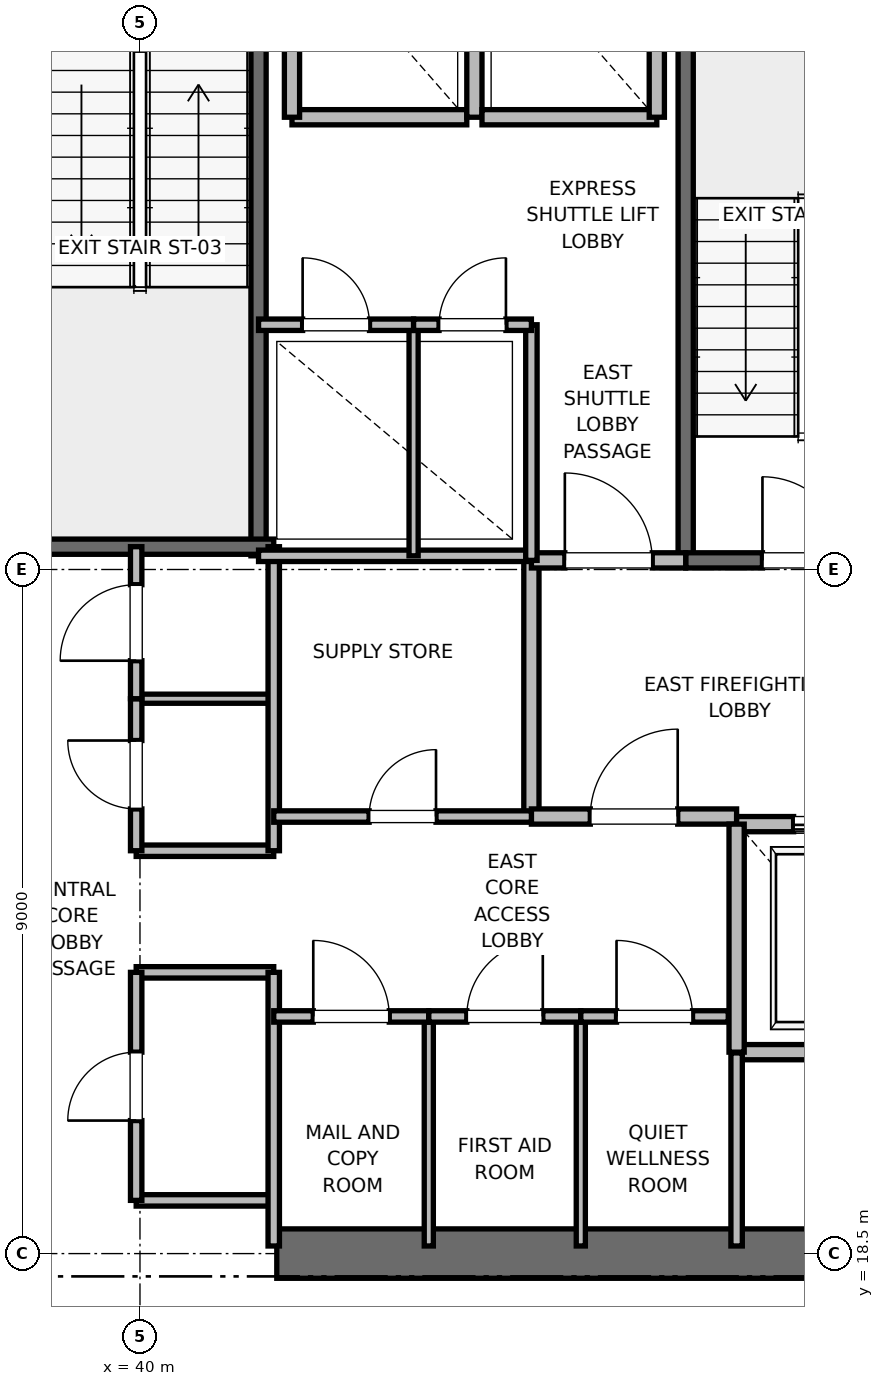
"""IFC4 building model, lengths in metres.
Left out: names, types, materials, properties, quantities, classifications, styles, units other than length and angle.
Written with IfcOpenShell. Run it as: python <this file> out.ifc"""

import sys

from ifc_helpers import new_model, si_unit, direction, frame, frame_2d, origin, place, context, subcontext, project, spatial, rectangle, extrude, element, fill, save


model = new_model("IFC4")
c1 = context("Model", 3, precision=1e-05, world=origin(), true_north=direction((0.0, 1.0)))
c2 = subcontext(c1, "Body", "Model", "MODEL_VIEW")
j1 = project(units=[si_unit("LENGTHUNIT", "METRE"), si_unit("PLANEANGLEUNIT", "RADIAN")], contexts=[c1])
p1 = place(None, origin())
s1 = spatial("IfcSite", under=j1, at=p1, CompositionType="ELEMENT")
p2 = place(p1, origin())
s2 = spatial("IfcBuilding", under=s1, at=p2, CompositionType="ELEMENT")
p3 = place(p2, frame((0.0, 0.0, 27.6)))
s3 = spatial("IfcBuildingStorey", under=s2, at=p3, CompositionType="ELEMENT", Elevation=27.6)
p4 = place(p3, frame((41.8, 18.5, 0.0), z_axis=(0.0, 0.0, 1.0), x_axis=(1.0, 0.0, 0.0)))
e1 = element("IfcWall", 1, at=p4, inside=s3, PredefinedType="SHEAR", context=c2, shape_type="SweptSolid", body=[
    extrude(rectangle(XDim=9.2, YDim=0.65, at=frame_2d((4.6, 0.0))), origin(), (0.0, 0.0, 1.0), 3.76),
])
p5 = place(p3, frame((47.18, 27.62, 0.0), z_axis=(0.0, 0.0, 1.0), x_axis=(0.0, 1.0, 0.0)))
e2 = element("IfcWall", 2, at=p5, inside=s3, PredefinedType="SOLIDWALL", context=c2, shape_type="SweptSolid", body=[
    extrude(rectangle(XDim=8.18, YDim=0.2, at=frame_2d((4.09, 0.0))), origin(), (0.0, 0.0, 1.0), 3.76),
])
p6 = place(p3, frame((47.18, 27.62, 0.0), z_axis=(0.0, 0.0, 1.0), x_axis=(1.0, 0.0, 0.0)))
e3 = element("IfcWall", 3, at=p6, inside=s3, PredefinedType="SOLIDWALL", context=c2, shape_type="SweptSolid", body=[
    extrude(rectangle(XDim=3.12, YDim=0.2, at=frame_2d((1.56, 0.0))), origin(), (0.0, 0.0, 1.0), 3.76),
])
p7 = place(p6, frame((1.01, 0.0, 0.0)))
e4 = element("IfcOpeningElement", 4, at=p7, cuts=e3, PredefinedType="OPENING", context=c2, shape_type="SweptSolid", body=[
    extrude(rectangle(XDim=1.1, YDim=2.15, at=frame_2d((0.55, 1.075))), frame((0.0, 0.1, 0.0), z_axis=(0.0, -1.0, 0.0), x_axis=(1.0, 0.0, 0.0)), (0.0, 0.0, 1.0), 0.2),
])
p8 = place(p3, frame((41.56, 27.68, 0.0), z_axis=(0.0, 0.0, 1.0), x_axis=(0.0, 1.0, 0.0)))
e5 = element("IfcWall", 5, at=p8, inside=s3, PredefinedType="SOLIDWALL", context=c2, shape_type="SweptSolid", body=[
    extrude(rectangle(XDim=8.57, YDim=0.2, at=frame_2d((4.285, 0.0))), origin(), (0.0, 0.0, 1.0), 3.76),
])
p9 = place(p3, frame((38.44, 27.8, 0.0), z_axis=(0.0, 0.0, 1.0), x_axis=(1.0, 0.0, 0.0)))
e6 = element("IfcWall", 6, at=p9, inside=s3, PredefinedType="SOLIDWALL", context=c2, shape_type="SweptSolid", body=[
    extrude(rectangle(XDim=3.32, YDim=0.2, at=frame_2d((1.66, 0.0))), origin(), (0.0, 0.0, 1.0), 3.76),
])
p10 = place(p3, frame((45.15, 24.25, 0.0), z_axis=(0.0, 0.0, 1.0), x_axis=(0.0, 1.0, 0.0)))
e7 = element("IfcWall", 7, at=p10, inside=s3, PredefinedType="PARTITIONING", context=c2, shape_type="SweptSolid", body=[
    extrude(rectangle(XDim=3.37, YDim=0.2, at=frame_2d((1.685, 0.0))), origin(), (0.0, 0.0, 1.0), 3.76),
])
p11 = place(p3, frame((45.15, 24.25, 0.0), z_axis=(0.0, 0.0, 1.0), x_axis=(1.0, 0.0, 0.0)))
e8 = element("IfcWall", 8, at=p11, inside=s3, PredefinedType="PARTITIONING", context=c2, shape_type="SweptSolid", body=[
    extrude(rectangle(XDim=2.7, YDim=0.2, at=frame_2d((1.35, 0.0))), origin(), (0.0, 0.0, 1.0), 3.76),
])
p12 = place(p11, frame((0.775, 0.0, 0.0)))
e9 = element("IfcOpeningElement", 9, at=p12, cuts=e8, PredefinedType="OPENING", context=c2, shape_type="SweptSolid", body=[
    extrude(rectangle(XDim=1.15, YDim=2.2, at=frame_2d((0.575, 1.1))), frame((0.0, 0.1, 0.0), z_axis=(0.0, -1.0, 0.0), x_axis=(1.0, 0.0, 0.0)), (0.0, 0.0, 1.0), 0.2),
])
p13 = place(p3, frame((45.15, 27.62, 0.0), z_axis=(0.0, 0.0, 1.0), x_axis=(1.0, 0.0, 0.0)))
e10 = element("IfcWall", 10, at=p13, inside=s3, PredefinedType="PARTITIONING", context=c2, shape_type="SweptSolid", body=[
    extrude(rectangle(XDim=2.03, YDim=0.2, at=frame_2d((1.015, 0.0))), origin(), (0.0, 0.0, 1.0), 3.76),
])
p14 = place(p13, frame((0.44, 0.0, 0.0)))
e11 = element("IfcOpeningElement", 11, at=p14, cuts=e10, PredefinedType="OPENING", context=c2, shape_type="SweptSolid", body=[
    extrude(rectangle(XDim=1.15, YDim=2.2, at=frame_2d((0.575, 1.1))), frame((0.0, 0.1, 0.0), z_axis=(0.0, -1.0, 0.0), x_axis=(1.0, 0.0, 0.0)), (0.0, 0.0, 1.0), 0.2),
])
p15 = place(p3, frame((47.85, 21.15, 0.0), z_axis=(0.0, 0.0, 1.0), x_axis=(1.0, 0.0, 0.0)))
e12 = element("IfcWall", 12, at=p15, inside=s3, PredefinedType="SOLIDWALL", context=c2, shape_type="SweptSolid", body=[
    extrude(rectangle(XDim=2.6, YDim=0.2, at=frame_2d((1.3, 0.0))), origin(), (0.0, 0.0, 1.0), 3.76),
])
p16 = place(p3, frame((50.45, 24.15, 0.0), z_axis=(0.0, 0.0, 1.0), x_axis=(-1.0, 0.0, 0.0)))
e13 = element("IfcWall", 13, at=p16, inside=s3, PredefinedType="SOLIDWALL", context=c2, shape_type="SweptSolid", body=[
    extrude(rectangle(XDim=2.6, YDim=0.2, at=frame_2d((1.3, 0.0))), origin(), (0.0, 0.0, 1.0), 2.54),
])
p17 = place(p16, frame((0.75, 0.0, 0.0)))
e14 = element("IfcOpeningElement", 14, at=p17, cuts=e13, PredefinedType="OPENING", context=c2, shape_type="SweptSolid", body=[
    extrude(rectangle(XDim=1.1, YDim=2.2, at=frame_2d((0.55, 1.1))), frame((0.0, 0.1, 0.0), z_axis=(0.0, -1.0, 0.0), x_axis=(1.0, 0.0, 0.0)), (0.0, 0.0, 1.0), 0.2),
])
p18 = place(p3, frame((47.85, 24.15, 0.0), z_axis=(0.0, 0.0, 1.0), x_axis=(0.0, -1.0, 0.0)))
e15 = element("IfcWall", 15, at=p18, inside=s3, PredefinedType="SOLIDWALL", context=c2, shape_type="SweptSolid", body=[
    extrude(rectangle(XDim=3.0, YDim=0.2, at=frame_2d((1.5, 0.0))), origin(), (0.0, 0.0, 1.0), 3.76),
])
p19 = place(p3, frame((42.0, 33.45, 0.0), z_axis=(0.0, 0.0, 1.0), x_axis=(1.0, 0.0, 0.0)))
e16 = element("IfcWall", 16, at=p19, inside=s3, PredefinedType="SOLIDWALL", context=c2, shape_type="SweptSolid", body=[
    extrude(rectangle(XDim=2.3, YDim=0.2, at=frame_2d((1.15, 0.0))), origin(), (0.0, 0.0, 1.0), 3.76),
])
for number, where, z_axis, x_axis in (
    (17, (42.0, 36.05, 0.0), (0.0, 0.0, 1.0), (0.0, -1.0, 0.0)),
    (18, (44.4, 33.45, 0.0), (0.0, 0.0, 1.0), (0.0, 1.0, 0.0)),
):
    element("IfcWall", number, at=place(p3, frame(where, z_axis=z_axis, x_axis=x_axis)), inside=s3, PredefinedType="SOLIDWALL", context=c2, shape_type="SweptSolid", body=[
        extrude(rectangle(XDim=2.6, YDim=0.2, at=frame_2d((1.3, 0.0))), origin(), (0.0, 0.0, 1.0), 2.54),
    ])
p20 = place(p3, frame((44.5, 33.45, 0.0), z_axis=(0.0, 0.0, 1.0), x_axis=(1.0, 0.0, 0.0)))
e19 = element("IfcWall", 19, at=p20, inside=s3, PredefinedType="SOLIDWALL", context=c2, shape_type="SweptSolid", body=[
    extrude(rectangle(XDim=2.3, YDim=0.2, at=frame_2d((1.15, 0.0))), origin(), (0.0, 0.0, 1.0), 3.76),
])
p21 = place(p3, frame((46.8, 33.45, 0.0), z_axis=(0.0, 0.0, 1.0), x_axis=(0.0, 1.0, 0.0)))
e20 = element("IfcWall", 20, at=p21, inside=s3, PredefinedType="SOLIDWALL", context=c2, shape_type="SweptSolid", body=[
    extrude(rectangle(XDim=2.6, YDim=0.2, at=frame_2d((1.3, 0.0))), origin(), (0.0, 0.0, 1.0), 3.76),
])
for number, where, z_axis, x_axis in (
    (21, (39.95, 19.2, 0.0), (0.0, 0.0, 1.0), (1.0, 0.0, 0.0)),
    (22, (39.95, 22.2, 0.0), (0.0, 0.0, 1.0), (1.0, 0.0, 0.0)),
    (23, (39.95, 23.8, 0.0), (0.0, 0.0, 1.0), (1.0, 0.0, 0.0)),
):
    element("IfcWall", number, at=place(p3, frame(where, z_axis=z_axis, x_axis=x_axis)), inside=s3, PredefinedType="PARTITIONING", context=c2, shape_type="SweptSolid", body=[
        extrude(rectangle(XDim=1.81, YDim=0.15, at=frame_2d((0.905, 0.0))), origin(), (0.0, 0.0, 1.0), 2.85),
    ])
p22 = place(p3, frame((39.95, 25.8, 0.0), z_axis=(0.0, 0.0, 1.0), x_axis=(1.0, 0.0, 0.0)))
e24 = element("IfcWall", 24, at=p22, inside=s3, PredefinedType="PARTITIONING", context=c2, shape_type="SweptSolid", body=[
    extrude(rectangle(XDim=1.81, YDim=0.12, at=frame_2d((0.905, 0.0))), origin(), (0.0, 0.0, 1.0), 2.85),
])
p23 = place(p3, frame((41.76, 18.6, 0.0), z_axis=(0.0, 0.0, 1.0), x_axis=(0.0, 1.0, 0.0)))
e25 = element("IfcWall", 25, at=p23, inside=s3, PredefinedType="PARTITIONING", context=c2, shape_type="SweptSolid", body=[
    extrude(rectangle(XDim=3.6, YDim=0.15, at=frame_2d((1.8, 0.0))), origin(), (0.0, 0.0, 1.0), 2.54),
])
p24 = place(p3, frame((41.76, 23.8, 0.0), z_axis=(0.0, 0.0, 1.0), x_axis=(0.0, 1.0, 0.0)))
e26 = element("IfcWall", 26, at=p24, inside=s3, PredefinedType="PARTITIONING", context=c2, shape_type="SweptSolid", body=[
    extrude(rectangle(XDim=4.0, YDim=0.15, at=frame_2d((2.0, 0.0))), origin(), (0.0, 0.0, 1.0), 2.85),
])
p25 = place(p3, frame((39.95, 19.2, 0.0), z_axis=(0.0, 0.0, 1.0), x_axis=(0.0, 1.0, 0.0)))
e27 = element("IfcWall", 27, at=p25, inside=s3, PredefinedType="PARTITIONING", context=c2, shape_type="SweptSolid", body=[
    extrude(rectangle(XDim=3.0, YDim=0.15, at=frame_2d((1.5, 0.0))), origin(), (0.0, 0.0, 1.0), 2.85),
])
p26 = place(p25, frame((1.05, 0.0, 0.0)))
e28 = element("IfcOpeningElement", 28, at=p26, cuts=e27, PredefinedType="OPENING", context=c2, shape_type="SweptSolid", body=[
    extrude(rectangle(XDim=0.9, YDim=2.1, at=frame_2d((0.45, 1.05))), frame((0.0, 0.075, 0.0), z_axis=(0.0, -1.0, 0.0), x_axis=(1.0, 0.0, 0.0)), (0.0, 0.0, 1.0), 0.15),
])
p27 = place(p3, frame((39.95, 23.8, 0.0), z_axis=(0.0, 0.0, 1.0), x_axis=(0.0, 1.0, 0.0)))
e29 = element("IfcWall", 29, at=p27, inside=s3, PredefinedType="PARTITIONING", context=c2, shape_type="SweptSolid", body=[
    extrude(rectangle(XDim=2.0, YDim=0.15, at=frame_2d((1.0, 0.0))), origin(), (0.0, 0.0, 1.0), 2.85),
])
p28 = place(p27, frame((0.55, 0.0, 0.0)))
e30 = element("IfcOpeningElement", 30, at=p28, cuts=e29, PredefinedType="OPENING", context=c2, shape_type="SweptSolid", body=[
    extrude(rectangle(XDim=0.9, YDim=2.1, at=frame_2d((0.45, 1.05))), frame((0.0, 0.075, 0.0), z_axis=(0.0, -1.0, 0.0), x_axis=(1.0, 0.0, 0.0)), (0.0, 0.0, 1.0), 0.15),
])
p29 = place(p3, frame((39.95, 25.8, 0.0), z_axis=(0.0, 0.0, 1.0), x_axis=(0.0, 1.0, 0.0)))
e31 = element("IfcWall", 31, at=p29, inside=s3, PredefinedType="PARTITIONING", context=c2, shape_type="SweptSolid", body=[
    extrude(rectangle(XDim=2.0, YDim=0.15, at=frame_2d((1.0, 0.0))), origin(), (0.0, 0.0, 1.0), 2.85),
])
p30 = place(p29, frame((0.5, 0.0, 0.0)))
e32 = element("IfcOpeningElement", 32, at=p30, cuts=e31, PredefinedType="OPENING", context=c2, shape_type="SweptSolid", body=[
    extrude(rectangle(XDim=1.0, YDim=2.15, at=frame_2d((0.5, 1.075))), frame((0.0, 0.075, 0.0), z_axis=(0.0, -1.0, 0.0), x_axis=(1.0, 0.0, 0.0)), (0.0, 0.0, 1.0), 0.15),
])
p31 = place(p3, frame((41.56, 27.68, 0.0), z_axis=(0.0, 0.0, 1.0), x_axis=(1.0, 0.0, 0.0)))
e33 = element("IfcWall", 33, at=p31, inside=s3, PredefinedType="PARTITIONING", context=c2, shape_type="SweptSolid", body=[
    extrude(rectangle(XDim=3.59, YDim=0.15, at=frame_2d((1.795, 0.0))), origin(), (0.0, 0.0, 1.0), 2.85),
])
p32 = place(p3, frame((47.85, 18.6, 0.0), z_axis=(0.0, 0.0, 1.0), x_axis=(0.0, 1.0, 0.0)))
e34 = element("IfcWall", 34, at=p32, inside=s3, PredefinedType="PARTITIONING", context=c2, shape_type="SweptSolid", body=[
    extrude(rectangle(XDim=2.54, YDim=0.15, at=frame_2d((1.27, 0.0))), origin(), (0.0, 0.0, 1.0), 2.85),
])
for number, where, z_axis, x_axis in (
    (35, (43.8, 18.6, 0.0), (0.0, 0.0, 1.0), (0.0, 1.0, 0.0)),
    (36, (45.8, 18.6, 0.0), (0.0, 0.0, 1.0), (0.0, 1.0, 0.0)),
):
    element("IfcWall", number, at=place(p3, frame(where, z_axis=z_axis, x_axis=x_axis)), inside=s3, PredefinedType="PARTITIONING", context=c2, shape_type="SweptSolid", body=[
        extrude(rectangle(XDim=3.02, YDim=0.12, at=frame_2d((1.51, 0.0))), origin(), (0.0, 0.0, 1.0), 2.85),
    ])
p33 = place(p3, frame((41.76, 21.62, 0.0), z_axis=(0.0, 0.0, 1.0), x_axis=(1.0, 0.0, 0.0)))
e37 = element("IfcWall", 37, at=p33, inside=s3, PredefinedType="PARTITIONING", context=c2, shape_type="SweptSolid", body=[
    extrude(rectangle(XDim=2.04, YDim=0.15, at=frame_2d((1.02, 0.0))), origin(), (0.0, 0.0, 1.0), 2.85),
])
p34 = place(p33, frame((0.52, 0.0, 0.0)))
e38 = element("IfcOpeningElement", 38, at=p34, cuts=e37, PredefinedType="OPENING", context=c2, shape_type="SweptSolid", body=[
    extrude(rectangle(XDim=1.0, YDim=2.15, at=frame_2d((0.5, 1.075))), frame((0.0, 0.075, 0.0), z_axis=(0.0, -1.0, 0.0), x_axis=(1.0, 0.0, 0.0)), (0.0, 0.0, 1.0), 0.15),
])
p35 = place(p3, frame((43.8, 21.62, 0.0), z_axis=(0.0, 0.0, 1.0), x_axis=(1.0, 0.0, 0.0)))
e39 = element("IfcWall", 39, at=p35, inside=s3, PredefinedType="PARTITIONING", context=c2, shape_type="SweptSolid", body=[
    extrude(rectangle(XDim=2.0, YDim=0.15, at=frame_2d((1.0, 0.0))), origin(), (0.0, 0.0, 1.0), 2.85),
])
p36 = place(p35, frame((0.5, 0.0, 0.0)))
e40 = element("IfcOpeningElement", 40, at=p36, cuts=e39, PredefinedType="OPENING", context=c2, shape_type="SweptSolid", body=[
    extrude(rectangle(XDim=1.0, YDim=2.15, at=frame_2d((0.5, 1.075))), frame((0.0, 0.075, 0.0), z_axis=(0.0, -1.0, 0.0), x_axis=(1.0, 0.0, 0.0)), (0.0, 0.0, 1.0), 0.15),
])
p37 = place(p3, frame((45.8, 21.62, 0.0), z_axis=(0.0, 0.0, 1.0), x_axis=(1.0, 0.0, 0.0)))
e41 = element("IfcWall", 41, at=p37, inside=s3, PredefinedType="PARTITIONING", context=c2, shape_type="SweptSolid", body=[
    extrude(rectangle(XDim=1.94, YDim=0.15, at=frame_2d((0.97, 0.0))), origin(), (0.0, 0.0, 1.0), 2.85),
])
p38 = place(p37, frame((0.47, 0.0, 0.0)))
e42 = element("IfcOpeningElement", 42, at=p38, cuts=e41, PredefinedType="OPENING", context=c2, shape_type="SweptSolid", body=[
    extrude(rectangle(XDim=1.0, YDim=2.15, at=frame_2d((0.5, 1.075))), frame((0.0, 0.075, 0.0), z_axis=(0.0, -1.0, 0.0), x_axis=(1.0, 0.0, 0.0)), (0.0, 0.0, 1.0), 0.15),
])
p39 = place(p3, frame((41.76, 24.25, 0.0), z_axis=(0.0, 0.0, 1.0), x_axis=(1.0, 0.0, 0.0)))
e43 = element("IfcWall", 43, at=p39, inside=s3, PredefinedType="PARTITIONING", context=c2, shape_type="SweptSolid", body=[
    extrude(rectangle(XDim=3.39, YDim=0.15, at=frame_2d((1.695, 0.0))), origin(), (0.0, 0.0, 1.0), 2.85),
])
p40 = place(p39, frame((1.255, 0.0, 0.0)))
e44 = element("IfcOpeningElement", 44, at=p40, cuts=e43, PredefinedType="OPENING", context=c2, shape_type="SweptSolid", body=[
    extrude(rectangle(XDim=0.88, YDim=2.1, at=frame_2d((0.44, 1.05))), frame((0.0, 0.075, 0.0), z_axis=(0.0, -1.0, 0.0), x_axis=(1.0, 0.0, 0.0)), (0.0, 0.0, 1.0), 0.15),
])
p41 = place(p3, frame((45.15, 27.62, 0.0), z_axis=(0.0, 0.0, 1.0), x_axis=(0.0, 1.0, 0.0)))
e45 = element("IfcWall", 45, at=p41, inside=s3, PredefinedType="PARTITIONING", context=c2, shape_type="SweptSolid", body=[
    extrude(rectangle(XDim=3.1, YDim=0.15, at=frame_2d((1.55, 0.0))), origin(), (0.0, 0.0, 1.0), 2.85),
])
p42 = place(p3, frame((43.6, 27.68, 0.0), z_axis=(0.0, 0.0, 1.0), x_axis=(0.0, 1.0, 0.0)))
e46 = element("IfcWall", 46, at=p42, inside=s3, PredefinedType="PARTITIONING", context=c2, shape_type="SweptSolid", body=[
    extrude(rectangle(XDim=3.04, YDim=0.12, at=frame_2d((1.52, 0.0))), origin(), (0.0, 0.0, 1.0), 2.85),
])
p43 = place(p3, frame((41.56, 30.72, 0.0), z_axis=(0.0, 0.0, 1.0), x_axis=(1.0, 0.0, 0.0)))
e47 = element("IfcWall", 47, at=p43, inside=s3, PredefinedType="PARTITIONING", context=c2, shape_type="SweptSolid", body=[
    extrude(rectangle(XDim=2.04, YDim=0.15, at=frame_2d((1.02, 0.0))), origin(), (0.0, 0.0, 1.0), 2.85),
])
p44 = place(p43, frame((0.58, 0.0, 0.0)))
e48 = element("IfcOpeningElement", 48, at=p44, cuts=e47, PredefinedType="OPENING", context=c2, shape_type="SweptSolid", body=[
    extrude(rectangle(XDim=0.88, YDim=2.1, at=frame_2d((0.44, 1.05))), frame((0.0, 0.075, 0.0), z_axis=(0.0, -1.0, 0.0), x_axis=(1.0, 0.0, 0.0)), (0.0, 0.0, 1.0), 0.15),
])
p45 = place(p3, frame((43.6, 30.72, 0.0), z_axis=(0.0, 0.0, 1.0), x_axis=(1.0, 0.0, 0.0)))
e49 = element("IfcWall", 49, at=p45, inside=s3, PredefinedType="PARTITIONING", context=c2, shape_type="SweptSolid", body=[
    extrude(rectangle(XDim=1.55, YDim=0.15, at=frame_2d((0.775, 0.0))), origin(), (0.0, 0.0, 1.0), 2.85),
])
p46 = place(p45, frame((0.335, 0.0, 0.0)))
e50 = element("IfcOpeningElement", 50, at=p46, cuts=e49, PredefinedType="OPENING", context=c2, shape_type="SweptSolid", body=[
    extrude(rectangle(XDim=0.88, YDim=2.1, at=frame_2d((0.44, 1.05))), frame((0.0, 0.075, 0.0), z_axis=(0.0, -1.0, 0.0), x_axis=(1.0, 0.0, 0.0)), (0.0, 0.0, 1.0), 0.15),
])
p47 = place(p7, origin())
e51 = element("IfcDoor", 51, at=p47, inside=s3, OperationType="SINGLE_SWING_LEFT", PredefinedType="DOOR", context=c2, shape_type="SweptSolid", body=[
    extrude(rectangle(XDim=1.1, YDim=2.15, at=frame_2d((0.55, 1.075))), frame((0.0, 0.025, 0.0), z_axis=(0.0, -1.0, 0.0), x_axis=(1.0, 0.0, 0.0)), (0.0, 0.0, 1.0), 0.05),
])
fill(e4, e51)
p48 = place(p12, origin())
e52 = element("IfcDoor", 52, at=p48, inside=s3, OperationType="SINGLE_SWING_RIGHT", PredefinedType="DOOR", context=c2, shape_type="SweptSolid", body=[
    extrude(rectangle(XDim=1.15, YDim=2.2, at=frame_2d((0.575, 1.1))), frame((0.0, 0.025, 0.0), z_axis=(0.0, -1.0, 0.0), x_axis=(1.0, 0.0, 0.0)), (0.0, 0.0, 1.0), 0.05),
])
fill(e9, e52)
p49 = place(p14, origin())
e53 = element("IfcDoor", 53, at=p49, inside=s3, OperationType="SINGLE_SWING_LEFT", PredefinedType="DOOR", context=c2, shape_type="SweptSolid", body=[
    extrude(rectangle(XDim=1.15, YDim=2.2, at=frame_2d((0.575, 1.1))), frame((0.0, 0.025, 0.0), z_axis=(0.0, -1.0, 0.0), x_axis=(1.0, 0.0, 0.0)), (0.0, 0.0, 1.0), 0.05),
])
fill(e11, e53)
p50 = place(p17, origin())
e54 = element("IfcDoor", 54, at=p50, inside=s3, OperationType="SLIDING_TO_RIGHT", PredefinedType="DOOR", context=c2, shape_type="SweptSolid", body=[
    extrude(rectangle(XDim=1.1, YDim=2.2, at=frame_2d((0.55, 1.1))), frame((0.0, 0.025, 0.0), z_axis=(0.0, -1.0, 0.0), x_axis=(1.0, 0.0, 0.0)), (0.0, 0.0, 1.0), 0.05),
])
fill(e14, e54)
p51 = place(p26, origin())
e55 = element("IfcDoor", 55, at=p51, inside=s3, OperationType="SINGLE_SWING_LEFT", PredefinedType="DOOR", context=c2, shape_type="SweptSolid", body=[
    extrude(rectangle(XDim=0.9, YDim=2.1, at=frame_2d((0.45, 1.05))), frame((0.0, 0.025, 0.0), z_axis=(0.0, -1.0, 0.0), x_axis=(1.0, 0.0, 0.0)), (0.0, 0.0, 1.0), 0.05),
])
fill(e28, e55)
p52 = place(p28, origin())
e56 = element("IfcDoor", 56, at=p52, inside=s3, OperationType="SINGLE_SWING_RIGHT", PredefinedType="DOOR", context=c2, shape_type="SweptSolid", body=[
    extrude(rectangle(XDim=0.9, YDim=2.1, at=frame_2d((0.45, 1.05))), frame((0.0, 0.025, 0.0), z_axis=(0.0, -1.0, 0.0), x_axis=(1.0, 0.0, 0.0)), (0.0, 0.0, 1.0), 0.05),
])
fill(e30, e56)
p53 = place(p30, origin())
e57 = element("IfcDoor", 57, at=p53, inside=s3, OperationType="SINGLE_SWING_LEFT", PredefinedType="DOOR", context=c2, shape_type="SweptSolid", body=[
    extrude(rectangle(XDim=1.0, YDim=2.15, at=frame_2d((0.5, 1.075))), frame((0.0, 0.025, 0.0), z_axis=(0.0, -1.0, 0.0), x_axis=(1.0, 0.0, 0.0)), (0.0, 0.0, 1.0), 0.05),
])
fill(e32, e57)
p54 = place(p34, origin())
e58 = element("IfcDoor", 58, at=p54, inside=s3, OperationType="SINGLE_SWING_LEFT", PredefinedType="DOOR", context=c2, shape_type="SweptSolid", body=[
    extrude(rectangle(XDim=1.0, YDim=2.15, at=frame_2d((0.5, 1.075))), frame((0.0, 0.025, 0.0), z_axis=(0.0, -1.0, 0.0), x_axis=(1.0, 0.0, 0.0)), (0.0, 0.0, 1.0), 0.05),
])
fill(e38, e58)
p55 = place(p36, origin())
e59 = element("IfcDoor", 59, at=p55, inside=s3, OperationType="SINGLE_SWING_RIGHT", PredefinedType="DOOR", context=c2, shape_type="SweptSolid", body=[
    extrude(rectangle(XDim=1.0, YDim=2.15, at=frame_2d((0.5, 1.075))), frame((0.0, 0.025, 0.0), z_axis=(0.0, -1.0, 0.0), x_axis=(1.0, 0.0, 0.0)), (0.0, 0.0, 1.0), 0.05),
])
fill(e40, e59)
p56 = place(p38, origin())
e60 = element("IfcDoor", 60, at=p56, inside=s3, OperationType="SINGLE_SWING_LEFT", PredefinedType="DOOR", context=c2, shape_type="SweptSolid", body=[
    extrude(rectangle(XDim=1.0, YDim=2.15, at=frame_2d((0.5, 1.075))), frame((0.0, 0.025, 0.0), z_axis=(0.0, -1.0, 0.0), x_axis=(1.0, 0.0, 0.0)), (0.0, 0.0, 1.0), 0.05),
])
fill(e42, e60)
p57 = place(p40, origin())
e61 = element("IfcDoor", 61, at=p57, inside=s3, OperationType="SINGLE_SWING_RIGHT", PredefinedType="DOOR", context=c2, shape_type="SweptSolid", body=[
    extrude(rectangle(XDim=0.88, YDim=2.1, at=frame_2d((0.44, 1.05))), frame((0.0, 0.025, 0.0), z_axis=(0.0, -1.0, 0.0), x_axis=(1.0, 0.0, 0.0)), (0.0, 0.0, 1.0), 0.05),
])
fill(e44, e61)
p58 = place(p44, origin())
e62 = element("IfcDoor", 62, at=p58, inside=s3, OperationType="SINGLE_SWING_LEFT", PredefinedType="DOOR", context=c2, shape_type="SweptSolid", body=[
    extrude(rectangle(XDim=0.88, YDim=2.1, at=frame_2d((0.44, 1.05))), frame((0.0, 0.025, 0.0), z_axis=(0.0, -1.0, 0.0), x_axis=(1.0, 0.0, 0.0)), (0.0, 0.0, 1.0), 0.05),
])
fill(e48, e62)
p59 = place(p46, origin())
e63 = element("IfcDoor", 63, at=p59, inside=s3, OperationType="SINGLE_SWING_RIGHT", PredefinedType="DOOR", context=c2, shape_type="SweptSolid", body=[
    extrude(rectangle(XDim=0.88, YDim=2.1, at=frame_2d((0.44, 1.05))), frame((0.0, 0.025, 0.0), z_axis=(0.0, -1.0, 0.0), x_axis=(1.0, 0.0, 0.0)), (0.0, 0.0, 1.0), 0.05),
])
fill(e50, e63)
save(model, sys.argv[1])
